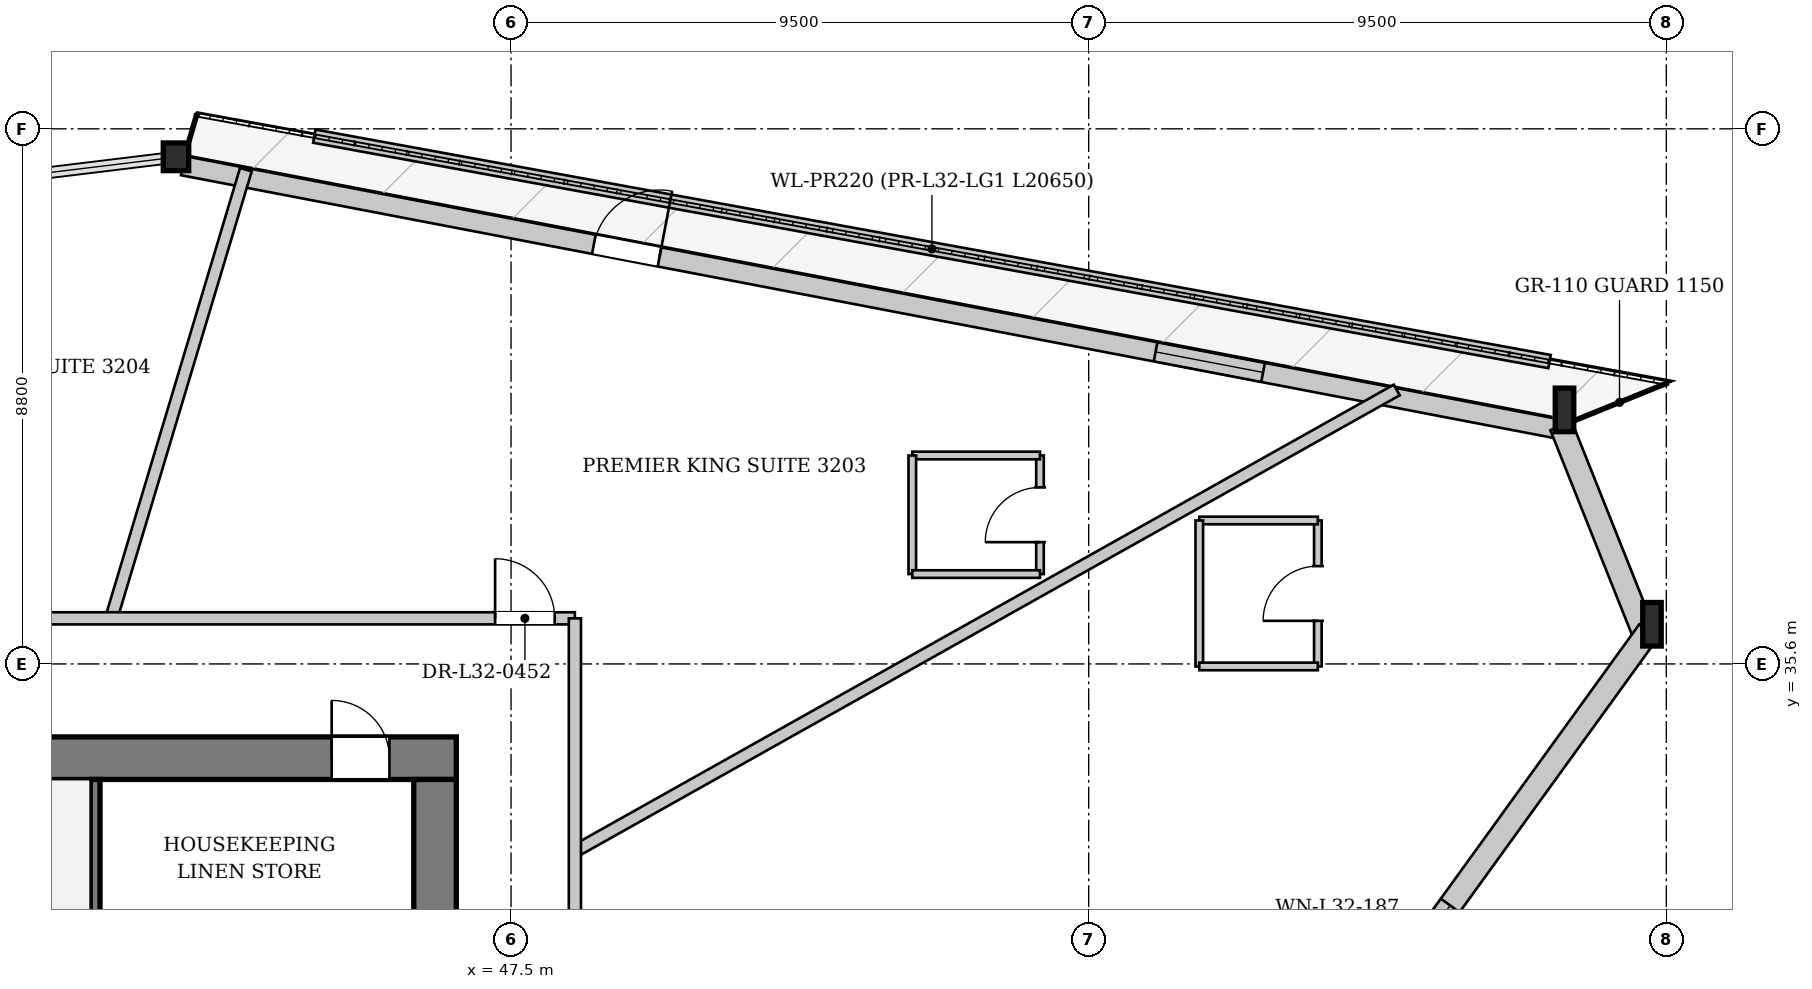
"""IFC4 building model, lengths in metres.
Left out: names, types, materials, properties, quantities, classifications, styles, units other than length and angle.
Written with IfcOpenShell. Run it as: python <this file> out.ifc"""

import sys

from ifc_helpers import new_model, si_unit, direction, frame, frame_2d, origin, origin_2d, place, context, subcontext, project, spatial, rectangle, i_section, extrude, source, transform, mapped, element, fill, save


model = new_model("IFC4")
c1 = context("Model", 3, precision=1e-05, world=origin(), true_north=direction((0.0, 1.0)))
c2 = subcontext(c1, "Body", "Model", "MODEL_VIEW")
j1 = project(units=[si_unit("LENGTHUNIT", "METRE"), si_unit("PLANEANGLEUNIT", "RADIAN")], contexts=[c1])
p1 = place(None, origin())
s1 = spatial("IfcSite", under=j1, at=p1, CompositionType="ELEMENT")
p2 = place(p1, origin())
s2 = spatial("IfcBuilding", under=s1, at=p2, CompositionType="ELEMENT")
p3 = place(p2, frame((0.0, 0.0, 123.45)))
s3 = spatial("IfcBuildingStorey", under=s2, at=p3, CompositionType="ELEMENT", Elevation=123.45)
m1 = source(origin(), c2, "Body", "SweptSolid", [
    extrude(i_section(OverallWidth=0.304, OverallDepth=0.716, WebThickness=0.021, FlangeThickness=0.04, at=origin_2d()), origin(), (0.0, 0.0, 1.0), 3.42),
])
p4 = place(p3, frame((66.364, 36.03, 0.0), z_axis=(-0.058395844812, 0.129927185279, 0.989802430707), x_axis=(-0.912108953762, -0.409947870427, 0.0)))
e1 = element("IfcColumn", 1, at=p4, inside=s3, PredefinedType="COLUMN", context=c2, shape_type="MappedRepresentation", body=[
    mapped(m1, transform((0.0, 0.0, 0.0), x_axis=(1.0, 0.0, 0.0), y_axis=(0.0, 1.0, 0.0), z_axis=(0.0, 0.0, 1.0), scale=1.0)),
])
m2 = source(origin(), c2, "Body", "SweptSolid", [
    extrude(i_section(OverallWidth=0.304, OverallDepth=0.716, WebThickness=0.021, FlangeThickness=0.04, at=origin_2d()), origin(), (0.0, 0.0, 1.0), 3.416),
])
p5 = place(p3, frame((64.946, 39.585, 0.0), z_axis=(-0.07047959591, 0.113153347186, 0.991074642285), x_axis=(-0.848810648346, -0.528696967321, 0.0)))
e2 = element("IfcColumn", 2, at=p5, inside=s3, PredefinedType="COLUMN", context=c2, shape_type="MappedRepresentation", body=[
    mapped(m2, transform((0.0, 0.0, 0.0), x_axis=(1.0, 0.0, 0.0), y_axis=(0.0, 1.0, 0.0), z_axis=(0.0, 0.0, 1.0), scale=1.0)),
])
m3 = source(origin(), c2, "Body", "SweptSolid", [
    extrude(i_section(OverallWidth=0.418, OverallDepth=0.455, WebThickness=0.038, FlangeThickness=0.059, at=origin_2d()), origin(), (0.0, 0.0, 1.0), 3.397),
])
p6 = place(p3, frame((42.132, 43.951, 0.0), z_axis=(-0.083584828026, -0.006755781457, 0.9964777649), x_axis=(0.080562731554, -0.996749540398, 0.0)))
e3 = element("IfcColumn", 3, at=p6, inside=s3, PredefinedType="COLUMN", context=c2, shape_type="MappedRepresentation", body=[
    mapped(m3, transform((0.0, 0.0, 0.0), x_axis=(1.0, 0.0, 0.0), y_axis=(0.0, 1.0, 0.0), z_axis=(0.0, 0.0, 1.0), scale=1.0)),
])
p7 = place(p3, frame((42.101, 43.794, 0.0), z_axis=(0.0, 0.0, 1.0), x_axis=(0.982169357398, -0.187998280282, 0.0)))
e4 = element("IfcWall", 4, at=p7, inside=s3, PredefinedType="SOLIDWALL", context=c2, shape_type="SweptSolid", body=[
    extrude(rectangle(XDim=23.229, YDim=0.32, at=frame_2d((11.614, 0.0))), origin(), (0.0, 0.0, 1.0), 2.692),
])
p8 = place(p7, frame((6.883, 0.0, 0.0)))
e5 = element("IfcOpeningElement", 5, at=p8, cuts=e4, PredefinedType="OPENING", context=c2, shape_type="SweptSolid", body=[
    extrude(rectangle(XDim=1.1, YDim=2.3, at=frame_2d((0.55, 1.15))), frame((0.0, 0.17, 0.0), z_axis=(0.0, -1.0, 0.0), x_axis=(1.0, 0.0, 0.0)), (0.0, 0.0, 1.0), 0.34),
])
p9 = place(p7, frame((16.289, 0.0, 0.372)))
e6 = element("IfcOpeningElement", 6, at=p9, cuts=e4, PredefinedType="OPENING", context=c2, shape_type="SweptSolid", body=[
    extrude(rectangle(XDim=1.8, YDim=2.2, at=frame_2d((0.9, 1.1))), frame((0.0, 0.17, 0.0), z_axis=(0.0, -1.0, 0.0), x_axis=(1.0, 0.0, 0.0)), (0.0, 0.0, 1.0), 0.34),
])
p10 = place(p3, frame((64.769, 39.514, 0.0), z_axis=(0.0, 0.0, 1.0), x_axis=(0.370565637882, -0.928806281213, 0.0)))
e7 = element("IfcWall", 7, at=p10, inside=s3, PredefinedType="SOLIDWALL", context=c2, shape_type="SweptSolid", body=[
    extrude(rectangle(XDim=3.827, YDim=0.38, at=frame_2d((1.914, 0.0))), origin(), (0.0, 0.0, 1.0), 2.692),
])
p11 = place(p3, frame((66.21, 36.142, 0.0), z_axis=(0.0, 0.0, 1.0), x_axis=(-0.586152279149, -0.810200904497, 0.0)))
e8 = element("IfcWall", 8, at=p11, inside=s3, PredefinedType="SOLIDWALL", context=c2, shape_type="SweptSolid", body=[
    extrude(rectangle(XDim=23.823, YDim=0.38, at=frame_2d((11.911, 0.0))), origin(), (0.0, 0.0, 1.0), 2.692),
])
p12 = place(p11, frame((5.57, 0.0, 0.322)))
e9 = element("IfcOpeningElement", 9, at=p12, cuts=e8, PredefinedType="OPENING", context=c2, shape_type="SweptSolid", body=[
    extrude(rectangle(XDim=2.2, YDim=2.25, at=frame_2d((1.1, 1.125))), frame((0.0, 0.2, 0.0), z_axis=(0.0, -1.0, 0.0), x_axis=(1.0, 0.0, 0.0)), (0.0, 0.0, 1.0), 0.4),
])
p13 = place(p11, frame((14.452, 0.0, 0.322)))
e10 = element("IfcOpeningElement", 10, at=p13, cuts=e8, PredefinedType="OPENING", context=c2, shape_type="SweptSolid", body=[
    extrude(rectangle(XDim=2.2, YDim=2.25, at=frame_2d((1.1, 1.125))), frame((0.0, 0.2, 0.0), z_axis=(0.0, -1.0, 0.0), x_axis=(1.0, 0.0, 0.0)), (0.0, 0.0, 1.0), 0.4),
])
p14 = place(p3, frame((64.58, 40.572, 0.0), z_axis=(0.0, 0.0, 1.0), x_axis=(-0.983755456177, 0.179513794575, 0.0)))
e11 = element("IfcWall", 11, at=p14, inside=s3, PredefinedType="PARAPET", context=c2, shape_type="SweptSolid", body=[
    extrude(rectangle(XDim=20.65, YDim=0.22, at=frame_2d((10.325, 0.0))), origin(), (0.0, 0.0, 1.0), 0.3),
])
p15 = place(p3, frame((29.4, 34.05, 0.0), z_axis=(0.0, 0.0, 1.0), x_axis=(1.0, 0.0, 0.0)))
e12 = element("IfcWall", 12, at=p15, inside=s3, PredefinedType="SHEAR", context=c2, shape_type="SweptSolid", body=[
    extrude(rectangle(XDim=17.2, YDim=0.7, at=frame_2d((8.6, 0.0))), origin(), (0.0, 0.0, 1.0), 3.3),
])
p16 = place(p15, frame((1.7, 0.0, 0.0)))
e13 = element("IfcOpeningElement", 13, at=p16, cuts=e12, PredefinedType="OPENING", context=c2, shape_type="SweptSolid", body=[
    extrude(rectangle(XDim=0.95, YDim=2.1, at=frame_2d((0.475, 1.05))), frame((0.0, 0.36, 0.0), z_axis=(0.0, -1.0, 0.0), x_axis=(1.0, 0.0, 0.0)), (0.0, 0.0, 1.0), 0.72),
])
p17 = place(p15, frame((4.08, 0.0, 0.0)))
e14 = element("IfcOpeningElement", 14, at=p17, cuts=e12, PredefinedType="OPENING", context=c2, shape_type="SweptSolid", body=[
    extrude(rectangle(XDim=1.32, YDim=2.2, at=frame_2d((0.66, 1.1))), frame((0.0, 0.36, 0.0), z_axis=(0.0, -1.0, 0.0), x_axis=(1.0, 0.0, 0.0)), (0.0, 0.0, 1.0), 0.72),
])
p18 = place(p15, frame((15.15, 0.0, 0.0)))
e15 = element("IfcOpeningElement", 15, at=p18, cuts=e12, PredefinedType="OPENING", context=c2, shape_type="SweptSolid", body=[
    extrude(rectangle(XDim=0.95, YDim=2.1, at=frame_2d((0.475, 1.05))), frame((0.0, 0.36, 0.0), z_axis=(0.0, -1.0, 0.0), x_axis=(1.0, 0.0, 0.0)), (0.0, 0.0, 1.0), 0.72),
])
p19 = place(p3, frame((46.25, 33.7, 0.0), z_axis=(0.0, 0.0, 1.0), x_axis=(0.0, -1.0, 0.0)))
e16 = element("IfcWall", 16, at=p19, inside=s3, PredefinedType="SHEAR", context=c2, shape_type="SweptSolid", body=[
    extrude(rectangle(XDim=14.2, YDim=0.7, at=frame_2d((7.1, 0.0))), origin(), (0.0, 0.0, 1.0), 3.3),
])
p20 = place(p19, frame((5.18, 0.0, 0.0)))
e17 = element("IfcOpeningElement", 17, at=p20, cuts=e16, PredefinedType="OPENING", context=c2, shape_type="SweptSolid", body=[
    extrude(rectangle(XDim=1.6, YDim=2.2, at=frame_2d((0.8, 1.1))), frame((0.0, 0.36, 0.0), z_axis=(0.0, -1.0, 0.0), x_axis=(1.0, 0.0, 0.0)), (0.0, 0.0, 1.0), 0.72),
])
p21 = place(p3, frame((40.66, 30.6, 0.0), z_axis=(0.0, 0.0, 1.0), x_axis=(0.0, 1.0, 0.0)))
e18 = element("IfcWall", 18, at=p21, inside=s3, PredefinedType="PARTITIONING", context=c2, shape_type="SweptSolid", body=[
    extrude(rectangle(XDim=3.1, YDim=0.16, at=frame_2d((1.55, 0.0))), origin(), (0.0, 0.0, 1.0), 3.3),
])
p22 = place(p3, frame((48.55, 32.521, 0.0), z_axis=(0.0, 0.0, 1.0), x_axis=(0.872074014934, 0.489374000613, 0.0)))
e19 = element("IfcWall", 19, at=p22, inside=s3, PredefinedType="PARTITIONING", context=c2, shape_type="SweptSolid", body=[
    extrude(rectangle(XDim=15.499, YDim=0.2, at=frame_2d((7.75, 0.0))), origin(), (0.0, 0.0, 1.0), 3.3),
])
p23 = place(p3, frame((40.925, 36.35, 0.0), z_axis=(0.0, 0.0, 1.0), x_axis=(0.287368239357, 0.957820178848, 0.0)))
e20 = element("IfcWall", 20, at=p23, inside=s3, PredefinedType="PARTITIONING", context=c2, shape_type="SweptSolid", body=[
    extrude(rectangle(XDim=7.703, YDim=0.2, at=frame_2d((3.852, 0.0))), origin(), (0.0, 0.0, 1.0), 3.3),
])
p24 = place(p3, frame((60.769, 35.559, 0.0), z_axis=(0.0, 0.0, 1.0), x_axis=(0.0, 1.0, 0.0)))
e21 = element("IfcWall", 21, at=p24, inside=s3, PredefinedType="PARTITIONING", context=c2, shape_type="SweptSolid", body=[
    extrude(rectangle(XDim=2.4, YDim=0.125, at=frame_2d((1.2, 0.0))), origin(), (0.0, 0.0, 1.0), 3.3),
])
p25 = place(p24, frame((0.75, 0.0, 0.0)))
e22 = element("IfcOpeningElement", 22, at=p25, cuts=e21, PredefinedType="OPENING", context=c2, shape_type="SweptSolid", body=[
    extrude(rectangle(XDim=0.9, YDim=2.1, at=frame_2d((0.45, 1.05))), frame((0.0, 0.073, 0.0), z_axis=(0.0, -1.0, 0.0), x_axis=(1.0, 0.0, 0.0)), (0.0, 0.0, 1.0), 0.145),
])
p26 = place(p3, frame((60.769, 37.959, 0.0), z_axis=(0.0, 0.0, 1.0), x_axis=(-1.0, 0.0, 0.0)))
e23 = element("IfcWall", 23, at=p26, inside=s3, PredefinedType="PARTITIONING", context=c2, shape_type="SweptSolid", body=[
    extrude(rectangle(XDim=1.95, YDim=0.125, at=frame_2d((0.975, 0.0))), origin(), (0.0, 0.0, 1.0), 2.795),
])
p27 = place(p3, frame((58.819, 37.959, 0.0), z_axis=(0.0, 0.0, 1.0), x_axis=(0.0, -1.0, 0.0)))
e24 = element("IfcWall", 24, at=p27, inside=s3, PredefinedType="PARTITIONING", context=c2, shape_type="SweptSolid", body=[
    extrude(rectangle(XDim=2.4, YDim=0.125, at=frame_2d((1.2, 0.0))), origin(), (0.0, 0.0, 1.0), 3.3),
])
p28 = place(p3, frame((58.819, 35.559, 0.0), z_axis=(0.0, 0.0, 1.0), x_axis=(1.0, 0.0, 0.0)))
e25 = element("IfcWall", 25, at=p28, inside=s3, PredefinedType="PARTITIONING", context=c2, shape_type="SweptSolid", body=[
    extrude(rectangle(XDim=1.95, YDim=0.125, at=frame_2d((0.975, 0.0))), origin(), (0.0, 0.0, 1.0), 3.3),
])
p29 = place(p3, frame((56.199, 37.078, 0.0), z_axis=(0.0, 0.0, 1.0), x_axis=(0.0, 1.0, 0.0)))
e26 = element("IfcWall", 26, at=p29, inside=s3, PredefinedType="PARTITIONING", context=c2, shape_type="SweptSolid", body=[
    extrude(rectangle(XDim=1.95, YDim=0.125, at=frame_2d((0.975, 0.0))), origin(), (0.0, 0.0, 1.0), 3.3),
])
p30 = place(p29, frame((0.525, 0.0, 0.0)))
e27 = element("IfcOpeningElement", 27, at=p30, cuts=e26, PredefinedType="OPENING", context=c2, shape_type="SweptSolid", body=[
    extrude(rectangle(XDim=0.9, YDim=2.1, at=frame_2d((0.45, 1.05))), frame((0.0, 0.073, 0.0), z_axis=(0.0, -1.0, 0.0), x_axis=(1.0, 0.0, 0.0)), (0.0, 0.0, 1.0), 0.145),
])
p31 = place(p3, frame((56.199, 39.028, 0.0), z_axis=(0.0, 0.0, 1.0), x_axis=(-1.0, 0.0, 0.0)))
e28 = element("IfcWall", 28, at=p31, inside=s3, PredefinedType="PARTITIONING", context=c2, shape_type="SweptSolid", body=[
    extrude(rectangle(XDim=2.1, YDim=0.125, at=frame_2d((1.05, 0.0))), origin(), (0.0, 0.0, 1.0), 3.3),
])
p32 = place(p3, frame((54.099, 39.028, 0.0), z_axis=(0.0, 0.0, 1.0), x_axis=(0.0, -1.0, 0.0)))
e29 = element("IfcWall", 29, at=p32, inside=s3, PredefinedType="PARTITIONING", context=c2, shape_type="SweptSolid", body=[
    extrude(rectangle(XDim=1.95, YDim=0.125, at=frame_2d((0.975, 0.0))), origin(), (0.0, 0.0, 1.0), 3.3),
])
p33 = place(p3, frame((54.099, 37.078, 0.0), z_axis=(0.0, 0.0, 1.0), x_axis=(1.0, 0.0, 0.0)))
e30 = element("IfcWall", 30, at=p33, inside=s3, PredefinedType="PARTITIONING", context=c2, shape_type="SweptSolid", body=[
    extrude(rectangle(XDim=2.1, YDim=0.125, at=frame_2d((1.05, 0.0))), origin(), (0.0, 0.0, 1.0), 3.045),
])
p34 = place(p3, frame((27.45, 36.35, 0.0), z_axis=(0.0, 0.0, 1.0), x_axis=(1.0, 0.0, 0.0)))
e31 = element("IfcWall", 31, at=p34, inside=s3, PredefinedType="PARTITIONING", context=c2, shape_type="SweptSolid", body=[
    extrude(rectangle(XDim=21.1, YDim=0.2, at=frame_2d((10.55, 0.0))), origin(), (0.0, 0.0, 1.0), 3.3),
])
p35 = place(p34, frame((19.788, 0.0, 0.0)))
e32 = element("IfcOpeningElement", 32, at=p35, cuts=e31, PredefinedType="OPENING", context=c2, shape_type="SweptSolid", body=[
    extrude(rectangle(XDim=0.98, YDim=2.15, at=frame_2d((0.49, 1.075))), frame((0.0, 0.11, 0.0), z_axis=(0.0, -1.0, 0.0), x_axis=(1.0, 0.0, 0.0)), (0.0, 0.0, 1.0), 0.22),
])
p36 = place(p34, frame((10.147, 0.0, 0.0)))
e33 = element("IfcOpeningElement", 33, at=p36, cuts=e31, PredefinedType="OPENING", context=c2, shape_type="SweptSolid", body=[
    extrude(rectangle(XDim=0.98, YDim=2.15, at=frame_2d((0.49, 1.075))), frame((0.0, 0.11, 0.0), z_axis=(0.0, -1.0, 0.0), x_axis=(1.0, 0.0, 0.0)), (0.0, 0.0, 1.0), 0.22),
])
p37 = place(p34, frame((0.3, 0.0, 0.0)))
e34 = element("IfcOpeningElement", 34, at=p37, cuts=e31, PredefinedType="OPENING", context=c2, shape_type="SweptSolid", body=[
    extrude(rectangle(XDim=0.98, YDim=2.15, at=frame_2d((0.49, 1.075))), frame((0.0, 0.11, 0.0), z_axis=(0.0, -1.0, 0.0), x_axis=(1.0, 0.0, 0.0)), (0.0, 0.0, 1.0), 0.22),
])
p38 = place(p3, frame((48.55, 16.85, 0.0), z_axis=(0.0, 0.0, 1.0), x_axis=(0.0, 1.0, 0.0)))
e35 = element("IfcWall", 35, at=p38, inside=s3, PredefinedType="PARTITIONING", context=c2, shape_type="SweptSolid", body=[
    extrude(rectangle(XDim=19.5, YDim=0.2, at=frame_2d((9.75, 0.0))), origin(), (0.0, 0.0, 1.0), 3.3),
])
p39 = place(p38, frame((10.851, 0.0, 0.0)))
e36 = element("IfcOpeningElement", 36, at=p39, cuts=e35, PredefinedType="OPENING", context=c2, shape_type="SweptSolid", body=[
    extrude(rectangle(XDim=0.98, YDim=2.15, at=frame_2d((0.49, 1.075))), frame((0.0, 0.11, 0.0), z_axis=(0.0, -1.0, 0.0), x_axis=(1.0, 0.0, 0.0)), (0.0, 0.0, 1.0), 0.22),
])
m4 = source(origin(), c2, "Body", "SweptSolid", [
    extrude(rectangle(XDim=1.1, YDim=2.3, at=frame_2d((0.55, 1.15))), frame((0.0, 0.025, 0.0), z_axis=(0.0, -1.0, 0.0), x_axis=(1.0, 0.0, 0.0)), (0.0, 0.0, 1.0), 0.05),
])
p40 = place(p8, origin())
e37 = element("IfcDoor", 37, at=p40, inside=s3, OperationType="SINGLE_SWING_RIGHT", PredefinedType="DOOR", context=c2, shape_type="MappedRepresentation", body=[
    mapped(m4, transform((0.0, 0.0, 0.0), x_axis=(1.0, 0.0, 0.0), y_axis=(0.0, 1.0, 0.0), z_axis=(0.0, 0.0, 1.0), scale=1.0)),
])
fill(e5, e37)
m5 = source(origin(), c2, "Body", "SweptSolid", [
    extrude(rectangle(XDim=1.8, YDim=2.2, at=frame_2d((0.9, 1.1))), frame((0.0, 0.03, 0.0), z_axis=(0.0, -1.0, 0.0), x_axis=(1.0, 0.0, 0.0)), (0.0, 0.0, 1.0), 0.06),
])
p41 = place(p9, origin())
e38 = element("IfcWindow", 38, at=p41, inside=s3, PartitioningType="SINGLE_PANEL", PredefinedType="WINDOW", context=c2, shape_type="MappedRepresentation", body=[
    mapped(m5, transform((0.0, 0.0, 0.0), x_axis=(1.0, 0.0, 0.0), y_axis=(0.0, 1.0, 0.0), z_axis=(0.0, 0.0, 1.0), scale=1.0)),
])
fill(e6, e38)
m6 = source(origin(), c2, "Body", "SweptSolid", [
    extrude(rectangle(XDim=2.2, YDim=2.25, at=frame_2d((1.1, 1.125))), frame((0.0, 0.03, 0.0), z_axis=(0.0, -1.0, 0.0), x_axis=(1.0, 0.0, 0.0)), (0.0, 0.0, 1.0), 0.06),
])
p42 = place(p12, origin())
e39 = element("IfcWindow", 39, at=p42, inside=s3, PartitioningType="SINGLE_PANEL", PredefinedType="WINDOW", context=c2, shape_type="MappedRepresentation", body=[
    mapped(m6, transform((0.0, 0.0, 0.0), x_axis=(1.0, 0.0, 0.0), y_axis=(0.0, 1.0, 0.0), z_axis=(0.0, 0.0, 1.0), scale=1.0)),
])
fill(e9, e39)
m7 = source(origin(), c2, "Body", "SweptSolid", [
    extrude(rectangle(XDim=0.95, YDim=2.1, at=frame_2d((0.475, 1.05))), frame((0.0, 0.025, 0.0), z_axis=(0.0, -1.0, 0.0), x_axis=(1.0, 0.0, 0.0)), (0.0, 0.0, 1.0), 0.05),
])
p43 = place(p18, origin())
e40 = element("IfcDoor", 40, at=p43, inside=s3, OperationType="SINGLE_SWING_LEFT", PredefinedType="DOOR", context=c2, shape_type="MappedRepresentation", body=[
    mapped(m7, transform((0.0, 0.0, 0.0), x_axis=(1.0, 0.0, 0.0), y_axis=(0.0, 1.0, 0.0), z_axis=(0.0, 0.0, 1.0), scale=1.0)),
])
fill(e15, e40)
m8 = source(origin(), c2, "Body", "SweptSolid", [
    extrude(rectangle(XDim=0.9, YDim=2.1, at=frame_2d((0.45, 1.05))), frame((0.0, 0.025, 0.0), z_axis=(0.0, -1.0, 0.0), x_axis=(1.0, 0.0, 0.0)), (0.0, 0.0, 1.0), 0.05),
])
p44 = place(p25, origin())
e41 = element("IfcDoor", 41, at=p44, inside=s3, OperationType="SINGLE_SWING_LEFT", PredefinedType="DOOR", context=c2, shape_type="MappedRepresentation", body=[
    mapped(m8, transform((0.0, 0.0, 0.0), x_axis=(1.0, 0.0, 0.0), y_axis=(0.0, 1.0, 0.0), z_axis=(0.0, 0.0, 1.0), scale=1.0)),
])
fill(e22, e41)
p45 = place(p30, origin())
e42 = element("IfcDoor", 42, at=p45, inside=s3, OperationType="SINGLE_SWING_LEFT", PredefinedType="DOOR", context=c2, shape_type="MappedRepresentation", body=[
    mapped(m8, transform((0.0, 0.0, 0.0), x_axis=(1.0, 0.0, 0.0), y_axis=(0.0, 1.0, 0.0), z_axis=(0.0, 0.0, 1.0), scale=1.0)),
])
fill(e27, e42)
m9 = source(origin(), c2, "Body", "SweptSolid", [
    extrude(rectangle(XDim=0.98, YDim=2.15, at=frame_2d((0.49, 1.075))), frame((0.0, 0.025, 0.0), z_axis=(0.0, -1.0, 0.0), x_axis=(1.0, 0.0, 0.0)), (0.0, 0.0, 1.0), 0.05),
])
p46 = place(p35, origin())
e43 = element("IfcDoor", 43, at=p46, inside=s3, OperationType="SINGLE_SWING_LEFT", PredefinedType="DOOR", context=c2, shape_type="MappedRepresentation", body=[
    mapped(m9, transform((0.0, 0.0, 0.0), x_axis=(1.0, 0.0, 0.0), y_axis=(0.0, 1.0, 0.0), z_axis=(0.0, 0.0, 1.0), scale=1.0)),
])
fill(e32, e43)
save(model, sys.argv[1])
